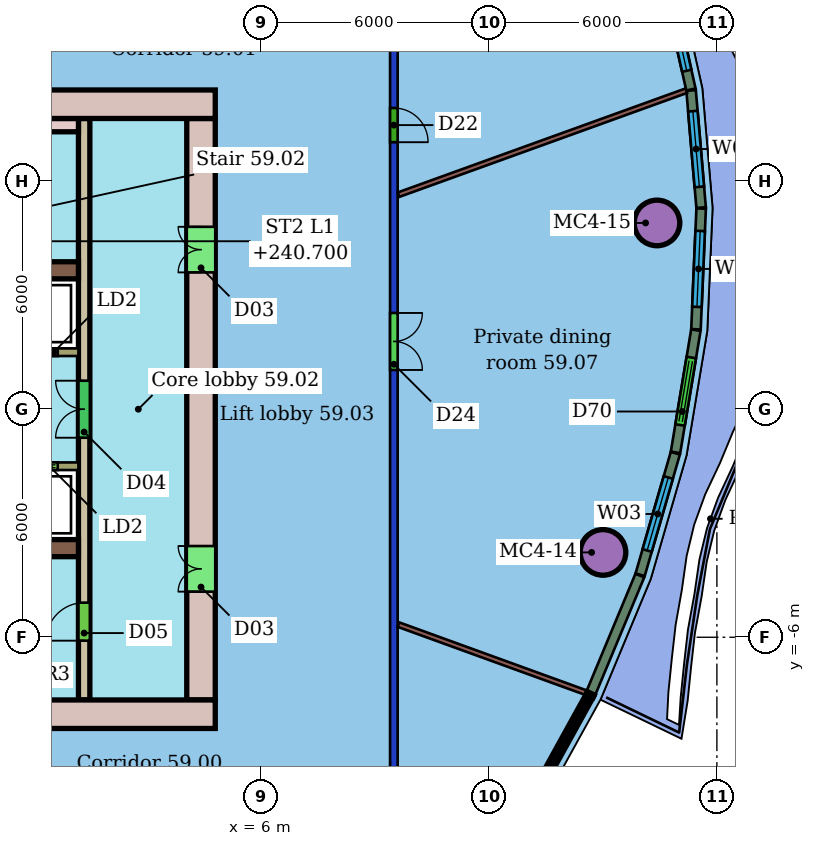
"""IFC4 building model, lengths in metres.
Left out: names, types, materials, properties, quantities, classifications, styles, units other than length and angle.
Written with IfcOpenShell. Run it as: python <this file> out.ifc"""

import sys

from ifc_helpers import new_model, si_unit, direction, frame, frame_2d, origin, origin_2d, place, context, subcontext, project, spatial, rectangle, hollow_circle, extrude, element, fill, save


model = new_model("IFC4")
c1 = context("Model", 3, precision=1e-05, world=origin(), true_north=direction((0.0, 1.0)))
c2 = subcontext(c1, "Body", "Model", "MODEL_VIEW")
j1 = project(units=[si_unit("LENGTHUNIT", "METRE"), si_unit("PLANEANGLEUNIT", "RADIAN")], contexts=[c1])
p1 = place(None, origin())
s1 = spatial("IfcSite", under=j1, at=p1, CompositionType="ELEMENT")
p2 = place(p1, origin())
s2 = spatial("IfcBuilding", under=s1, at=p2, CompositionType="ELEMENT")
p3 = place(p2, frame((0.0, 0.0, 238.9)))
s3 = spatial("IfcBuildingStorey", under=s2, at=p3, CompositionType="ELEMENT", Elevation=238.9)
for number, where, z_axis, x_axis in (
    (1, (15.003, -3.768, 0.0), (0.0, 0.0, 1.0), (1.0, 0.0, 0.0)),
    (2, (16.424, 4.901, 0.0), (0.0, 0.0, 1.0), (1.0, 0.0, 0.0)),
):
    element("IfcColumn", number, at=place(p3, frame(where, z_axis=z_axis, x_axis=x_axis)), inside=s3, PredefinedType="COLUMN", context=c2, shape_type="SweptSolid", body=[
        extrude(hollow_circle(Radius=0.6, WallThickness=0.045, at=origin_2d()), origin(), (0.0, 0.0, 1.0), 3.4),
    ])
p4 = place(p3, frame((9.5, 10.4, 0.0), z_axis=(0.0, 0.0, 1.0), x_axis=(0.0, -1.0, 0.0)))
e3 = element("IfcWall", 3, at=p4, inside=s3, PredefinedType="PARTITIONING", context=c2, shape_type="SweptSolid", body=[
    extrude(rectangle(XDim=20.8, YDim=0.2, at=frame_2d((10.4, 0.0))), origin(), (0.0, 0.0, 1.0), 3.0),
])
p5 = place(p4, frame((7.867, 0.0, 0.0)))
e4 = element("IfcOpeningElement", 4, at=p5, cuts=e3, PredefinedType="OPENING", context=c2, shape_type="SweptSolid", body=[
    extrude(rectangle(XDim=1.5, YDim=2.1, at=frame_2d((0.75, 1.05))), frame((0.0, 0.11, 0.0), z_axis=(0.0, -1.0, 0.0), x_axis=(1.0, 0.0, 0.0)), (0.0, 0.0, 1.0), 0.22),
])
p6 = place(p4, frame((2.474, 0.0, 0.0)))
e5 = element("IfcOpeningElement", 5, at=p6, cuts=e3, PredefinedType="OPENING", context=c2, shape_type="SweptSolid", body=[
    extrude(rectangle(XDim=0.9, YDim=2.1, at=frame_2d((0.45, 1.05))), frame((0.0, 0.11, 0.0), z_axis=(0.0, -1.0, 0.0), x_axis=(1.0, 0.0, 0.0)), (0.0, 0.0, 1.0), 0.22),
])
p7 = place(p3, frame((14.554, -7.457, 0.0), z_axis=(0.0, 0.0, 1.0), x_axis=(-0.940040430466, 0.341063028031, 0.0)))
e6 = element("IfcWall", 6, at=p7, inside=s3, PredefinedType="PARTITIONING", context=c2, shape_type="SweptSolid", body=[
    extrude(rectangle(XDim=5.247, YDim=0.125, at=frame_2d((2.624, 0.0))), origin(), (0.0, 0.0, 1.0), 3.4),
])
p8 = place(p3, frame((17.196, 8.382, 0.0), z_axis=(0.0, 0.0, 1.0), x_axis=(-0.94047829394, -0.339853760649, 0.0)))
e7 = element("IfcWall", 7, at=p8, inside=s3, PredefinedType="PARTITIONING", context=c2, shape_type="SweptSolid", body=[
    extrude(rectangle(XDim=8.054, YDim=0.125, at=frame_2d((4.027, 0.0))), origin(), (0.0, 0.0, 1.0), 3.4),
])
p9 = place(p3, frame((14.688, -7.461, 0.0), z_axis=(0.0, 0.0, 1.0), x_axis=(0.384516815747, 0.923117987263, 0.0)))
e8 = element("IfcWall", 8, at=p9, inside=s3, PredefinedType="SOLIDWALL", context=c2, shape_type="SweptSolid", body=[
    extrude(rectangle(XDim=3.342, YDim=0.25, at=frame_2d((1.671, 0.0))), origin(), (0.0, 0.0, 1.0), 3.05),
])
p10 = place(p3, frame((15.98, -4.355, 0.0), z_axis=(0.0, 0.0, 1.0), x_axis=(0.278253906266, 0.960507555227, 0.0)))
e9 = element("IfcWall", 9, at=p10, inside=s3, PredefinedType="SOLIDWALL", context=c2, shape_type="SweptSolid", body=[
    extrude(rectangle(XDim=3.33, YDim=0.25, at=frame_2d((1.665, 0.0))), origin(), (0.0, 0.0, 1.0), 3.05),
])
p11 = place(p10, frame((0.665, 0.0, 0.9)))
e10 = element("IfcOpeningElement", 10, at=p11, cuts=e9, PredefinedType="OPENING", context=c2, shape_type="SweptSolid", body=[
    extrude(rectangle(XDim=2.0, YDim=2.1, at=frame_2d((1.0, 1.05))), frame((0.0, 0.135, 0.0), z_axis=(0.0, -1.0, 0.0), x_axis=(1.0, 0.0, 0.0)), (0.0, 0.0, 1.0), 0.27),
])
p12 = place(p3, frame((16.911, -1.135, 0.0), z_axis=(0.0, 0.0, 1.0), x_axis=(0.164313973675, 0.986408089005, 0.0)))
e11 = element("IfcWall", 11, at=p12, inside=s3, PredefinedType="SOLIDWALL", context=c2, shape_type="SweptSolid", body=[
    extrude(rectangle(XDim=3.26, YDim=0.25, at=frame_2d((1.63, 0.0))), origin(), (0.0, 0.0, 1.0), 3.05),
])
p13 = place(p12, frame((0.73, 0.0, 0.0)))
e12 = element("IfcOpeningElement", 12, at=p13, cuts=e11, PredefinedType="OPENING", context=c2, shape_type="SweptSolid", body=[
    extrude(rectangle(XDim=1.8, YDim=2.4, at=frame_2d((0.9, 1.2))), frame((0.0, 0.135, 0.0), z_axis=(0.0, -1.0, 0.0), x_axis=(1.0, 0.0, 0.0)), (0.0, 0.0, 1.0), 0.27),
])
p14 = place(p3, frame((17.449, 2.103, 0.0), z_axis=(0.0, 0.0, 1.0), x_axis=(0.042837542995, 0.99908205114, 0.0)))
e13 = element("IfcWall", 13, at=p14, inside=s3, PredefinedType="SOLIDWALL", context=c2, shape_type="SweptSolid", body=[
    extrude(rectangle(XDim=3.18, YDim=0.25, at=frame_2d((1.59, 0.0))), origin(), (0.0, 0.0, 1.0), 3.05),
])
p15 = place(p14, frame((0.59, 0.0, 0.9)))
e14 = element("IfcOpeningElement", 14, at=p15, cuts=e13, PredefinedType="OPENING", context=c2, shape_type="SweptSolid", body=[
    extrude(rectangle(XDim=2.0, YDim=2.1, at=frame_2d((1.0, 1.05))), frame((0.0, 0.135, 0.0), z_axis=(0.0, -1.0, 0.0), x_axis=(1.0, 0.0, 0.0)), (0.0, 0.0, 1.0), 0.27),
])
p16 = place(p3, frame((17.585, 5.304, 0.0), z_axis=(0.0, 0.0, 1.0), x_axis=(-0.08534968294, 0.996351058424, 0.0)))
e15 = element("IfcWall", 15, at=p16, inside=s3, PredefinedType="SOLIDWALL", context=c2, shape_type="SweptSolid", body=[
    extrude(rectangle(XDim=3.095, YDim=0.25, at=frame_2d((1.547, 0.0))), origin(), (0.0, 0.0, 1.0), 3.05),
])
p17 = place(p16, frame((0.548, 0.0, 0.9)))
e16 = element("IfcOpeningElement", 16, at=p17, cuts=e15, PredefinedType="OPENING", context=c2, shape_type="SweptSolid", body=[
    extrude(rectangle(XDim=2.0, YDim=2.1, at=frame_2d((1.0, 1.05))), frame((0.0, 0.135, 0.0), z_axis=(0.0, -1.0, 0.0), x_axis=(1.0, 0.0, 0.0)), (0.0, 0.0, 1.0), 0.27),
])
p18 = place(p3, frame((17.317, 8.413, 0.0), z_axis=(0.0, 0.0, 1.0), x_axis=(-0.218861882791, 0.975755848694, 0.0)))
e17 = element("IfcWall", 17, at=p18, inside=s3, PredefinedType="SOLIDWALL", context=c2, shape_type="SweptSolid", body=[
    extrude(rectangle(XDim=3.011, YDim=0.25, at=frame_2d((1.505, 0.0))), origin(), (0.0, 0.0, 1.0), 3.05),
])
p19 = place(p18, frame((0.505, 0.0, 0.9)))
e18 = element("IfcOpeningElement", 18, at=p19, cuts=e17, PredefinedType="OPENING", context=c2, shape_type="SweptSolid", body=[
    extrude(rectangle(XDim=2.0, YDim=2.1, at=frame_2d((1.0, 1.05))), frame((0.0, 0.135, 0.0), z_axis=(0.0, -1.0, 0.0), x_axis=(1.0, 0.0, 0.0)), (0.0, 0.0, 1.0), 0.27),
])
p20 = place(p3, frame((4.8, 8.025, 0.0), z_axis=(0.0, 0.0, 1.0), x_axis=(-1.0, 0.0, 0.0)))
e19 = element("IfcWall", 19, at=p20, inside=s3, PredefinedType="SHEAR", context=c2, shape_type="SweptSolid", body=[
    extrude(rectangle(XDim=10.8, YDim=0.75, at=frame_2d((5.4, 0.0))), origin(), (0.0, 0.0, 1.0), 3.3),
])
p21 = place(p20, frame((4.4, 0.0, 0.0)))
e20 = element("IfcOpeningElement", 20, at=p21, cuts=e19, PredefinedType="OPENING", context=c2, shape_type="SweptSolid", body=[
    extrude(rectangle(XDim=1.2, YDim=2.1, at=frame_2d((0.6, 1.05))), frame((0.0, 0.385, 0.0), z_axis=(0.0, -1.0, 0.0), x_axis=(1.0, 0.0, 0.0)), (0.0, 0.0, 1.0), 0.77),
])
p22 = place(p3, frame((-16.8, -8.025, 0.0), z_axis=(0.0, 0.0, 1.0), x_axis=(1.0, 0.0, 0.0)))
e21 = element("IfcWall", 21, at=p22, inside=s3, PredefinedType="SHEAR", context=c2, shape_type="SweptSolid", body=[
    extrude(rectangle(XDim=21.6, YDim=0.75, at=frame_2d((10.8, 0.0))), origin(), (0.0, 0.0, 1.0), 3.3),
])
p23 = place(p22, frame((4.8, 0.0, 0.0)))
e22 = element("IfcOpeningElement", 22, at=p23, cuts=e21, PredefinedType="OPENING", context=c2, shape_type="SweptSolid", body=[
    extrude(rectangle(XDim=1.2, YDim=2.1, at=frame_2d((0.6, 1.05))), frame((0.0, 0.385, 0.0), z_axis=(0.0, -1.0, 0.0), x_axis=(1.0, 0.0, 0.0)), (0.0, 0.0, 1.0), 0.77),
])
p24 = place(p3, frame((4.425, -7.65, 0.0), z_axis=(0.0, 0.0, 1.0), x_axis=(0.0, 1.0, 0.0)))
e23 = element("IfcWall", 23, at=p24, inside=s3, PredefinedType="SHEAR", context=c2, shape_type="SweptSolid", body=[
    extrude(rectangle(XDim=15.3, YDim=0.75, at=frame_2d((7.65, 0.0))), origin(), (0.0, 0.0, 1.0), 3.3),
])
p25 = place(p24, frame((2.85, 0.0, 0.0)))
e24 = element("IfcOpeningElement", 24, at=p25, cuts=e23, PredefinedType="OPENING", context=c2, shape_type="SweptSolid", body=[
    extrude(rectangle(XDim=1.2, YDim=2.1, at=frame_2d((0.6, 1.05))), frame((0.0, 0.385, 0.0), z_axis=(0.0, -1.0, 0.0), x_axis=(1.0, 0.0, 0.0)), (0.0, 0.0, 1.0), 0.77),
])
p26 = place(p24, frame((11.25, 0.0, 0.0)))
e25 = element("IfcOpeningElement", 25, at=p26, cuts=e23, PredefinedType="OPENING", context=c2, shape_type="SweptSolid", body=[
    extrude(rectangle(XDim=1.2, YDim=2.1, at=frame_2d((0.6, 1.05))), frame((0.0, 0.385, 0.0), z_axis=(0.0, -1.0, 0.0), x_axis=(1.0, 0.0, 0.0)), (0.0, 0.0, 1.0), 0.77),
])
for number, where, z_axis, x_axis in (
    (26, (-6.0, 3.655, 0.0), (0.0, 0.0, 1.0), (1.0, 0.0, 0.0)),
    (27, (-6.0, -3.655, 0.0), (0.0, 0.0, 1.0), (1.0, 0.0, 0.0)),
):
    element("IfcWall", number, at=place(p3, frame(where, z_axis=z_axis, x_axis=x_axis)), inside=s3, PredefinedType="SHEAR", context=c2, shape_type="SweptSolid", body=[
        extrude(rectangle(XDim=7.2, YDim=0.45, at=frame_2d((3.6, 0.0))), origin(), (0.0, 0.0, 1.0), 3.3),
    ])
p27 = place(p3, frame((1.35, -7.65, 0.0), z_axis=(0.0, 0.0, 1.0), x_axis=(0.0, 1.0, 0.0)))
e28 = element("IfcWall", 28, at=p27, inside=s3, PredefinedType="SHEAR", context=c2, shape_type="SweptSolid", body=[
    extrude(rectangle(XDim=15.3, YDim=0.3, at=frame_2d((7.65, 0.0))), origin(), (0.0, 0.0, 1.0), 3.3),
])
p28 = place(p27, frame((1.56, 0.0, 0.0)))
e29 = element("IfcOpeningElement", 29, at=p28, cuts=e28, PredefinedType="OPENING", context=c2, shape_type="SweptSolid", body=[
    extrude(rectangle(XDim=1.0, YDim=2.1, at=frame_2d((0.5, 1.05))), frame((0.0, 0.16, 0.0), z_axis=(0.0, -1.0, 0.0), x_axis=(1.0, 0.0, 0.0)), (0.0, 0.0, 1.0), 0.32),
])
p29 = place(p27, frame((6.9, 0.0, 0.0)))
e30 = element("IfcOpeningElement", 30, at=p29, cuts=e28, PredefinedType="OPENING", context=c2, shape_type="SweptSolid", body=[
    extrude(rectangle(XDim=1.5, YDim=2.1, at=frame_2d((0.75, 1.05))), frame((0.0, 0.16, 0.0), z_axis=(0.0, -1.0, 0.0), x_axis=(1.0, 0.0, 0.0)), (0.0, 0.0, 1.0), 0.32),
])
p30 = place(p3, frame((-13.2, 1.5, 0.0), z_axis=(0.0, 0.0, 1.0), x_axis=(1.0, 0.0, 0.0)))
e31 = element("IfcWall", 31, at=p30, inside=s3, PredefinedType="SHEAR", context=c2, shape_type="SweptSolid", body=[
    extrude(rectangle(XDim=14.4, YDim=0.2, at=frame_2d((7.2, 0.0))), origin(), (0.0, 0.0, 1.0), 3.3),
])
p31 = place(p30, frame((10.312, 0.0, 0.0)))
e32 = element("IfcOpeningElement", 32, at=p31, cuts=e31, PredefinedType="OPENING", context=c2, shape_type="SweptSolid", body=[
    extrude(rectangle(XDim=1.1, YDim=2.1, at=frame_2d((0.55, 1.05))), frame((0.0, 0.11, 0.0), z_axis=(0.0, -1.0, 0.0), x_axis=(1.0, 0.0, 0.0)), (0.0, 0.0, 1.0), 0.22),
])
p32 = place(p30, frame((12.754, 0.0, 0.0)))
e33 = element("IfcOpeningElement", 33, at=p32, cuts=e31, PredefinedType="OPENING", context=c2, shape_type="SweptSolid", body=[
    extrude(rectangle(XDim=1.1, YDim=2.1, at=frame_2d((0.55, 1.05))), frame((0.0, 0.11, 0.0), z_axis=(0.0, -1.0, 0.0), x_axis=(1.0, 0.0, 0.0)), (0.0, 0.0, 1.0), 0.22),
])
p33 = place(p30, frame((0.15, 0.0, 0.0)))
e34 = element("IfcOpeningElement", 34, at=p33, cuts=e31, PredefinedType="OPENING", context=c2, shape_type="SweptSolid", body=[
    extrude(rectangle(XDim=0.9, YDim=2.1, at=frame_2d((0.45, 1.05))), frame((0.0, 0.11, 0.0), z_axis=(0.0, -1.0, 0.0), x_axis=(1.0, 0.0, 0.0)), (0.0, 0.0, 1.0), 0.22),
])
p34 = place(p30, frame((4.983, 0.0, 0.0)))
e35 = element("IfcOpeningElement", 35, at=p34, cuts=e31, PredefinedType="OPENING", context=c2, shape_type="SweptSolid", body=[
    extrude(rectangle(XDim=0.9, YDim=2.1, at=frame_2d((0.45, 1.05))), frame((0.0, 0.11, 0.0), z_axis=(0.0, -1.0, 0.0), x_axis=(1.0, 0.0, 0.0)), (0.0, 0.0, 1.0), 0.22),
])
p35 = place(p3, frame((1.2, -1.5, 0.0), z_axis=(0.0, 0.0, 1.0), x_axis=(-1.0, 0.0, 0.0)))
e36 = element("IfcWall", 36, at=p35, inside=s3, PredefinedType="SHEAR", context=c2, shape_type="SweptSolid", body=[
    extrude(rectangle(XDim=14.4, YDim=0.2, at=frame_2d((7.2, 0.0))), origin(), (0.0, 0.0, 1.0), 3.3),
])
p36 = place(p35, frame((7.821, 0.0, 0.0)))
e37 = element("IfcOpeningElement", 37, at=p36, cuts=e36, PredefinedType="OPENING", context=c2, shape_type="SweptSolid", body=[
    extrude(rectangle(XDim=1.2, YDim=2.1, at=frame_2d((0.6, 1.05))), frame((0.0, 0.11, 0.0), z_axis=(0.0, -1.0, 0.0), x_axis=(1.0, 0.0, 0.0)), (0.0, 0.0, 1.0), 0.22),
])
p37 = place(p35, frame((0.546, 0.0, 0.0)))
e38 = element("IfcOpeningElement", 38, at=p37, cuts=e36, PredefinedType="OPENING", context=c2, shape_type="SweptSolid", body=[
    extrude(rectangle(XDim=1.1, YDim=2.1, at=frame_2d((0.55, 1.05))), frame((0.0, 0.11, 0.0), z_axis=(0.0, -1.0, 0.0), x_axis=(1.0, 0.0, 0.0)), (0.0, 0.0, 1.0), 0.22),
])
p38 = place(p35, frame((2.592, 0.0, 0.0)))
e39 = element("IfcOpeningElement", 39, at=p38, cuts=e36, PredefinedType="OPENING", context=c2, shape_type="SweptSolid", body=[
    extrude(rectangle(XDim=1.0, YDim=2.1, at=frame_2d((0.5, 1.05))), frame((0.0, 0.11, 0.0), z_axis=(0.0, -1.0, 0.0), x_axis=(1.0, 0.0, 0.0)), (0.0, 0.0, 1.0), 0.22),
])
p39 = place(p3, frame((0.4, 7.475, 0.0), z_axis=(0.0, 0.0, 1.0), x_axis=(1.0, 0.0, 0.0)))
e40 = element("IfcWall", 40, at=p39, inside=s3, PredefinedType="SHEAR", context=c2, shape_type="SweptSolid", body=[
    extrude(rectangle(XDim=0.8, YDim=0.35, at=frame_2d((0.4, 0.0))), origin(), (0.0, 0.0, 1.0), 3.3),
])
p40 = place(p5, origin())
e41 = element("IfcDoor", 41, at=p40, inside=s3, OperationType="DOUBLE_DOOR_SINGLE_SWING", PredefinedType="DOOR", context=c2, shape_type="SweptSolid", body=[
    extrude(rectangle(XDim=1.5, YDim=2.1, at=frame_2d((0.75, 1.05))), frame((0.0, 0.025, 0.0), z_axis=(0.0, -1.0, 0.0), x_axis=(1.0, 0.0, 0.0)), (0.0, 0.0, 1.0), 0.05),
])
fill(e4, e41)
p41 = place(p6, origin())
e42 = element("IfcDoor", 42, at=p41, inside=s3, OperationType="SINGLE_SWING_RIGHT", PredefinedType="DOOR", context=c2, shape_type="SweptSolid", body=[
    extrude(rectangle(XDim=0.9, YDim=2.1, at=frame_2d((0.45, 1.05))), frame((0.0, 0.025, 0.0), z_axis=(0.0, -1.0, 0.0), x_axis=(1.0, 0.0, 0.0)), (0.0, 0.0, 1.0), 0.05),
])
fill(e5, e42)
p42 = place(p11, origin())
e43 = element("IfcWindow", 43, at=p42, inside=s3, PartitioningType="SINGLE_PANEL", PredefinedType="WINDOW", context=c2, shape_type="SweptSolid", body=[
    extrude(rectangle(XDim=2.0, YDim=2.1, at=frame_2d((1.0, 1.05))), frame((0.0, 0.03, 0.0), z_axis=(0.0, -1.0, 0.0), x_axis=(1.0, 0.0, 0.0)), (0.0, 0.0, 1.0), 0.06),
])
fill(e10, e43)
p43 = place(p13, origin())
e44 = element("IfcDoor", 44, at=p43, inside=s3, OperationType="DOUBLE_DOOR_SLIDING", PredefinedType="DOOR", context=c2, shape_type="SweptSolid", body=[
    extrude(rectangle(XDim=1.8, YDim=2.4, at=frame_2d((0.9, 1.2))), frame((0.0, 0.025, 0.0), z_axis=(0.0, -1.0, 0.0), x_axis=(1.0, 0.0, 0.0)), (0.0, 0.0, 1.0), 0.05),
])
fill(e12, e44)
p44 = place(p15, origin())
e45 = element("IfcWindow", 45, at=p44, inside=s3, PartitioningType="SINGLE_PANEL", PredefinedType="WINDOW", context=c2, shape_type="SweptSolid", body=[
    extrude(rectangle(XDim=2.0, YDim=2.1, at=frame_2d((1.0, 1.05))), frame((0.0, 0.03, 0.0), z_axis=(0.0, -1.0, 0.0), x_axis=(1.0, 0.0, 0.0)), (0.0, 0.0, 1.0), 0.06),
])
fill(e14, e45)
p45 = place(p17, origin())
e46 = element("IfcWindow", 46, at=p45, inside=s3, PartitioningType="SINGLE_PANEL", PredefinedType="WINDOW", context=c2, shape_type="SweptSolid", body=[
    extrude(rectangle(XDim=2.0, YDim=2.1, at=frame_2d((1.0, 1.05))), frame((0.0, 0.03, 0.0), z_axis=(0.0, -1.0, 0.0), x_axis=(1.0, 0.0, 0.0)), (0.0, 0.0, 1.0), 0.06),
])
fill(e16, e46)
p46 = place(p19, origin())
e47 = element("IfcWindow", 47, at=p46, inside=s3, PartitioningType="SINGLE_PANEL", PredefinedType="WINDOW", context=c2, shape_type="SweptSolid", body=[
    extrude(rectangle(XDim=2.0, YDim=2.1, at=frame_2d((1.0, 1.05))), frame((0.0, 0.03, 0.0), z_axis=(0.0, -1.0, 0.0), x_axis=(1.0, 0.0, 0.0)), (0.0, 0.0, 1.0), 0.06),
])
fill(e18, e47)
p47 = place(p25, origin())
e48 = element("IfcDoor", 48, at=p47, inside=s3, OperationType="DOUBLE_DOOR_SINGLE_SWING", PredefinedType="NOTDEFINED", context=c2, shape_type="SweptSolid", body=[
    extrude(rectangle(XDim=1.2, YDim=2.1, at=frame_2d((0.6, 1.05))), frame((0.0, 0.025, 0.0), z_axis=(0.0, -1.0, 0.0), x_axis=(1.0, 0.0, 0.0)), (0.0, 0.0, 1.0), 0.05),
])
fill(e24, e48)
p48 = place(p26, origin())
e49 = element("IfcDoor", 49, at=p48, inside=s3, OperationType="DOUBLE_DOOR_SINGLE_SWING", PredefinedType="NOTDEFINED", context=c2, shape_type="SweptSolid", body=[
    extrude(rectangle(XDim=1.2, YDim=2.1, at=frame_2d((0.6, 1.05))), frame((0.0, 0.025, 0.0), z_axis=(0.0, -1.0, 0.0), x_axis=(1.0, 0.0, 0.0)), (0.0, 0.0, 1.0), 0.05),
])
fill(e25, e49)
p49 = place(p28, origin())
e50 = element("IfcDoor", 50, at=p49, inside=s3, OperationType="SINGLE_SWING_LEFT", PredefinedType="NOTDEFINED", context=c2, shape_type="SweptSolid", body=[
    extrude(rectangle(XDim=1.0, YDim=2.1, at=frame_2d((0.5, 1.05))), frame((0.0, 0.025, 0.0), z_axis=(0.0, -1.0, 0.0), x_axis=(1.0, 0.0, 0.0)), (0.0, 0.0, 1.0), 0.05),
])
fill(e29, e50)
p50 = place(p29, origin())
e51 = element("IfcDoor", 51, at=p50, inside=s3, OperationType="DOUBLE_DOOR_SINGLE_SWING", PredefinedType="NOTDEFINED", context=c2, shape_type="SweptSolid", body=[
    extrude(rectangle(XDim=1.5, YDim=2.1, at=frame_2d((0.75, 1.05))), frame((0.0, 0.025, 0.0), z_axis=(0.0, -1.0, 0.0), x_axis=(1.0, 0.0, 0.0)), (0.0, 0.0, 1.0), 0.05),
])
fill(e30, e51)
p51 = place(p32, origin())
e52 = element("IfcDoor", 52, at=p51, inside=s3, OperationType="DOUBLE_DOOR_SLIDING", PredefinedType="NOTDEFINED", context=c2, shape_type="SweptSolid", body=[
    extrude(rectangle(XDim=1.1, YDim=2.1, at=frame_2d((0.55, 1.05))), frame((0.0, 0.025, 0.0), z_axis=(0.0, -1.0, 0.0), x_axis=(1.0, 0.0, 0.0)), (0.0, 0.0, 1.0), 0.05),
])
fill(e33, e52)
p52 = place(p37, origin())
e53 = element("IfcDoor", 53, at=p52, inside=s3, OperationType="DOUBLE_DOOR_SLIDING", PredefinedType="NOTDEFINED", context=c2, shape_type="SweptSolid", body=[
    extrude(rectangle(XDim=1.1, YDim=2.1, at=frame_2d((0.55, 1.05))), frame((0.0, 0.025, 0.0), z_axis=(0.0, -1.0, 0.0), x_axis=(1.0, 0.0, 0.0)), (0.0, 0.0, 1.0), 0.05),
])
fill(e38, e53)
save(model, sys.argv[1])
